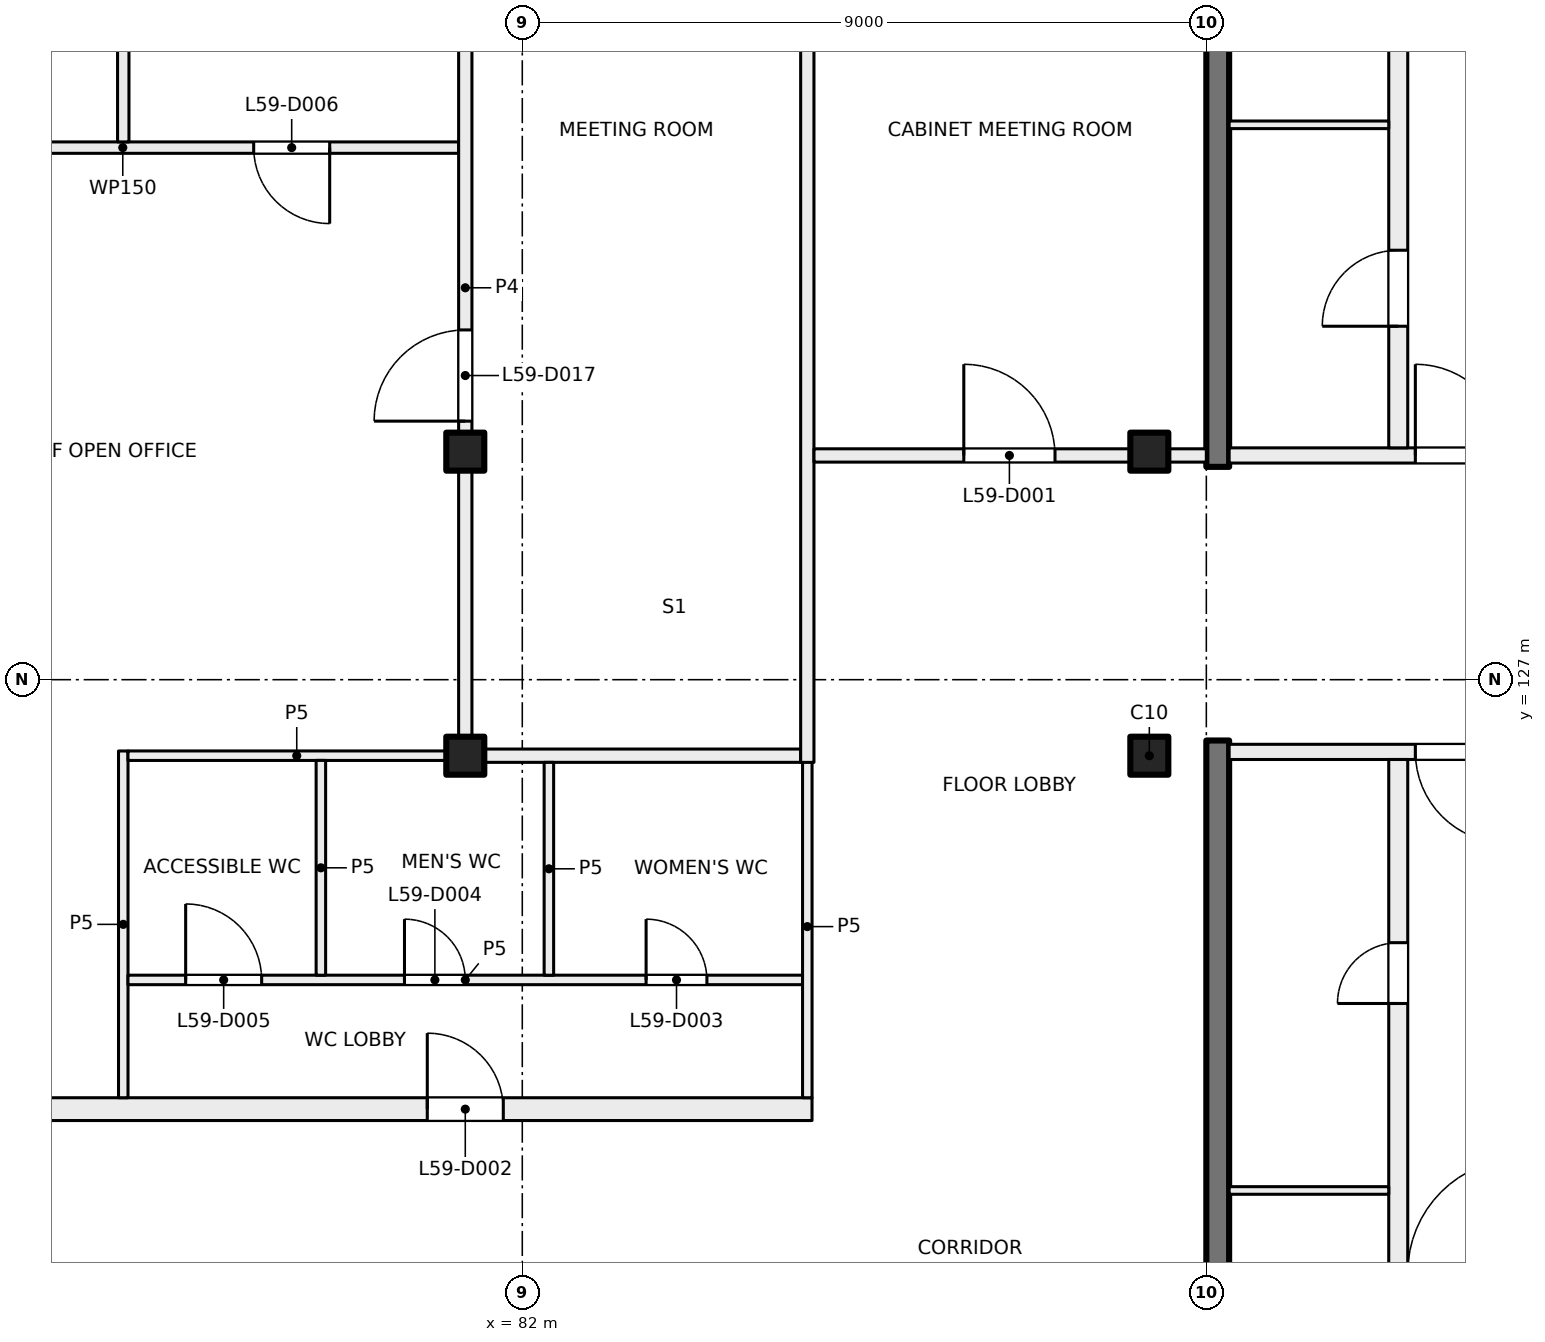
"""IFC4 building model, lengths in metres.
Left out: names, types, materials, properties, quantities, classifications, styles, units other than length and angle.
Written with IfcOpenShell. Run it as: python <this file> out.ifc"""

import sys

from ifc_helpers import new_model, si_unit, direction, frame, frame_2d, origin, origin_2d, place, context, subcontext, project, spatial, rectangle, extrude, element, fill, save


model = new_model("IFC4")
c1 = context("Model", 3, precision=1e-05, world=origin(), true_north=direction((0.0, 1.0)))
c2 = subcontext(c1, "Body", "Model", "MODEL_VIEW")
j1 = project(units=[si_unit("LENGTHUNIT", "METRE"), si_unit("PLANEANGLEUNIT", "RADIAN")], contexts=[c1])
p1 = place(None, origin())
s1 = spatial("IfcSite", under=j1, at=p1, CompositionType="ELEMENT")
p2 = place(p1, origin())
s2 = spatial("IfcBuilding", under=s1, at=p2, CompositionType="ELEMENT")
p3 = place(p2, frame((0.0, 0.0, 249.5)))
s3 = spatial("IfcBuildingStorey", under=s2, at=p3, CompositionType="ELEMENT", Elevation=249.5)
for number, where, z_axis, x_axis in (
    (1, (81.25, 130.0, 0.0), (0.0, 0.0, 1.0), (1.0, 0.0, 0.0)),
    (2, (90.25, 130.0, 0.0), (0.0, 0.0, 1.0), (1.0, 0.0, 0.0)),
    (3, (81.25, 126.0, 0.0), (0.0, 0.0, 1.0), (1.0, 0.0, 0.0)),
    (4, (90.25, 126.0, 0.0), (0.0, 0.0, 1.0), (1.0, 0.0, 0.0)),
):
    element("IfcColumn", number, at=place(p3, frame(where, z_axis=z_axis, x_axis=x_axis)), inside=s3, PredefinedType="COLUMN", context=c2, shape_type="SweptSolid", body=[
        extrude(rectangle(XDim=0.5, YDim=0.5, at=origin_2d()), origin(), (0.0, 0.0, 1.0), 4.0),
    ])
for number, where, z_axis, x_axis in (
    (5, (91.15, 138.55, 0.0), (0.0, 0.0, 1.0), (0.0, -1.0, 0.0)),
    (6, (91.15, 126.2, 0.0), (0.0, 0.0, 1.0), (0.0, -1.0, 0.0)),
):
    element("IfcWall", number, at=place(p3, frame(where, z_axis=z_axis, x_axis=x_axis)), inside=s3, PredefinedType="SHEAR", context=c2, shape_type="SweptSolid", body=[
        extrude(rectangle(XDim=8.75, YDim=0.3, at=frame_2d((4.375, 0.0))), origin(), (0.0, 0.0, 1.0), 4.0),
    ])
p4 = place(p3, frame((95.25, 126.05, 0.0), z_axis=(0.0, 0.0, 1.0), x_axis=(-1.0, 0.0, 0.0)))
e7 = element("IfcWall", 7, at=p4, inside=s3, PredefinedType="PARTITIONING", context=c2, shape_type="SweptSolid", body=[
    extrude(rectangle(XDim=3.95, YDim=0.2, at=frame_2d((1.975, 0.0))), origin(), (0.0, 0.0, 1.0), 3.625),
])
p5 = place(p4, frame((0.3, 0.0, 0.0)))
e8 = element("IfcOpeningElement", 8, at=p5, cuts=e7, PredefinedType="OPENING", context=c2, shape_type="SweptSolid", body=[
    extrude(rectangle(XDim=1.2, YDim=2.1, at=frame_2d((0.6, 1.05))), frame((0.0, 0.11, 0.0), z_axis=(0.0, -1.0, 0.0), x_axis=(1.0, 0.0, 0.0)), (0.0, 0.0, 1.0), 0.22),
])
p6 = place(p3, frame((93.525, 117.45, 0.0), z_axis=(0.0, 0.0, 1.0), x_axis=(0.0, 1.0, 0.0)))
e9 = element("IfcWall", 9, at=p6, inside=s3, PredefinedType="PARTITIONING", context=c2, shape_type="SweptSolid", body=[
    extrude(rectangle(XDim=8.5, YDim=0.25, at=frame_2d((4.25, 0.0))), origin(), (0.0, 0.0, 1.0), 3.625),
])
p7 = place(p6, frame((5.29, 0.0, 0.0)))
e10 = element("IfcOpeningElement", 10, at=p7, cuts=e9, PredefinedType="OPENING", context=c2, shape_type="SweptSolid", body=[
    extrude(rectangle(XDim=0.8, YDim=2.1, at=frame_2d((0.4, 1.05))), frame((0.0, 0.135, 0.0), z_axis=(0.0, -1.0, 0.0), x_axis=(1.0, 0.0, 0.0)), (0.0, 0.0, 1.0), 0.27),
])
p8 = place(p6, frame((0.99, 0.0, 0.0)))
e11 = element("IfcOpeningElement", 11, at=p8, cuts=e9, PredefinedType="OPENING", context=c2, shape_type="SweptSolid", body=[
    extrude(rectangle(XDim=0.8, YDim=2.1, at=frame_2d((0.4, 1.05))), frame((0.0, 0.135, 0.0), z_axis=(0.0, -1.0, 0.0), x_axis=(1.0, 0.0, 0.0)), (0.0, 0.0, 1.0), 0.27),
])
p9 = place(p3, frame((93.4, 120.28, 0.0), z_axis=(0.0, 0.0, 1.0), x_axis=(-1.0, 0.0, 0.0)))
e12 = element("IfcWall", 12, at=p9, inside=s3, PredefinedType="PARTITIONING", context=c2, shape_type="SweptSolid", body=[
    extrude(rectangle(XDim=2.1, YDim=0.1, at=frame_2d((1.05, 0.0))), origin(), (0.0, 0.0, 1.0), 3.625),
])
p10 = place(p3, frame((91.3, 129.95, 0.0), z_axis=(0.0, 0.0, 1.0), x_axis=(1.0, 0.0, 0.0)))
e13 = element("IfcWall", 13, at=p10, inside=s3, PredefinedType="PARTITIONING", context=c2, shape_type="SweptSolid", body=[
    extrude(rectangle(XDim=3.95, YDim=0.2, at=frame_2d((1.975, 0.0))), origin(), (0.0, 0.0, 1.0), 3.625),
])
p11 = place(p10, frame((2.45, 0.0, 0.0)))
e14 = element("IfcOpeningElement", 14, at=p11, cuts=e13, PredefinedType="OPENING", context=c2, shape_type="SweptSolid", body=[
    extrude(rectangle(XDim=1.2, YDim=2.1, at=frame_2d((0.6, 1.05))), frame((0.0, 0.11, 0.0), z_axis=(0.0, -1.0, 0.0), x_axis=(1.0, 0.0, 0.0)), (0.0, 0.0, 1.0), 0.22),
])
p12 = place(p3, frame((93.525, 130.05, 0.0), z_axis=(0.0, 0.0, 1.0), x_axis=(0.0, 1.0, 0.0)))
e15 = element("IfcWall", 15, at=p12, inside=s3, PredefinedType="PARTITIONING", context=c2, shape_type="SweptSolid", body=[
    extrude(rectangle(XDim=8.5, YDim=0.25, at=frame_2d((4.25, 0.0))), origin(), (0.0, 0.0, 1.0), 3.625),
])
p13 = place(p12, frame((1.6, 0.0, 0.0)))
e16 = element("IfcOpeningElement", 16, at=p13, cuts=e15, PredefinedType="OPENING", context=c2, shape_type="SweptSolid", body=[
    extrude(rectangle(XDim=1.0, YDim=2.1, at=frame_2d((0.5, 1.05))), frame((0.0, 0.135, 0.0), z_axis=(0.0, -1.0, 0.0), x_axis=(1.0, 0.0, 0.0)), (0.0, 0.0, 1.0), 0.27),
])
p14 = place(p12, frame((6.0, 0.0, 0.0)))
e17 = element("IfcOpeningElement", 17, at=p14, cuts=e15, PredefinedType="OPENING", context=c2, shape_type="SweptSolid", body=[
    extrude(rectangle(XDim=0.8, YDim=2.1, at=frame_2d((0.4, 1.05))), frame((0.0, 0.135, 0.0), z_axis=(0.0, -1.0, 0.0), x_axis=(1.0, 0.0, 0.0)), (0.0, 0.0, 1.0), 0.27),
])
p15 = place(p3, frame((91.3, 134.3, 0.0), z_axis=(0.0, 0.0, 1.0), x_axis=(1.0, 0.0, 0.0)))
e18 = element("IfcWall", 18, at=p15, inside=s3, PredefinedType="PARTITIONING", context=c2, shape_type="SweptSolid", body=[
    extrude(rectangle(XDim=2.1, YDim=0.1, at=frame_2d((1.05, 0.0))), origin(), (0.0, 0.0, 1.0), 3.625),
])
p16 = place(p3, frame((54.4, 121.35, 0.0), z_axis=(0.0, 0.0, 1.0), x_axis=(1.0, 0.0, 0.0)))
e19 = element("IfcWall", 19, at=p16, inside=s3, PredefinedType="PARTITIONING", context=c2, shape_type="SweptSolid", body=[
    extrude(rectangle(XDim=31.412, YDim=0.3, at=frame_2d((15.706, 0.0))), origin(), (0.0, 0.0, 1.0), 3.625),
])
p17 = place(p16, frame((26.35, 0.0, 0.0)))
e20 = element("IfcOpeningElement", 20, at=p17, cuts=e19, PredefinedType="OPENING", context=c2, shape_type="SweptSolid", body=[
    extrude(rectangle(XDim=1.0, YDim=2.1, at=frame_2d((0.5, 1.05))), frame((0.0, 0.16, 0.0), z_axis=(0.0, -1.0, 0.0), x_axis=(1.0, 0.0, 0.0)), (0.0, 0.0, 1.0), 0.32),
])
p18 = place(p16, frame((19.2, 0.0, 0.0)))
e21 = element("IfcOpeningElement", 21, at=p18, cuts=e19, PredefinedType="OPENING", context=c2, shape_type="SweptSolid", body=[
    extrude(rectangle(XDim=1.8, YDim=2.1, at=frame_2d((0.9, 1.05))), frame((0.0, 0.16, 0.0), z_axis=(0.0, -1.0, 0.0), x_axis=(1.0, 0.0, 0.0)), (0.0, 0.0, 1.0), 0.32),
])
p19 = place(p16, frame((15.0, 0.0, 0.0)))
e22 = element("IfcOpeningElement", 22, at=p19, cuts=e19, PredefinedType="OPENING", context=c2, shape_type="SweptSolid", body=[
    extrude(rectangle(XDim=1.2, YDim=2.1, at=frame_2d((0.6, 1.05))), frame((0.0, 0.16, 0.0), z_axis=(0.0, -1.0, 0.0), x_axis=(1.0, 0.0, 0.0)), (0.0, 0.0, 1.0), 0.32),
])
p20 = place(p16, frame((11.45, 0.0, 0.0)))
e23 = element("IfcOpeningElement", 23, at=p20, cuts=e19, PredefinedType="OPENING", context=c2, shape_type="SweptSolid", body=[
    extrude(rectangle(XDim=0.8, YDim=2.1, at=frame_2d((0.4, 1.05))), frame((0.0, 0.16, 0.0), z_axis=(0.0, -1.0, 0.0), x_axis=(1.0, 0.0, 0.0)), (0.0, 0.0, 1.0), 0.32),
])
p21 = place(p16, frame((3.515, 0.0, 0.0)))
e24 = element("IfcOpeningElement", 24, at=p21, cuts=e19, PredefinedType="OPENING", context=c2, shape_type="SweptSolid", body=[
    extrude(rectangle(XDim=1.8, YDim=2.1, at=frame_2d((0.9, 1.05))), frame((0.0, 0.16, 0.0), z_axis=(0.0, -1.0, 0.0), x_axis=(1.0, 0.0, 0.0)), (0.0, 0.0, 1.0), 0.32),
])
p22 = place(p3, frame((81.162, 134.0, 0.0), z_axis=(0.0, 0.0, 1.0), x_axis=(-1.0, 0.0, 0.0)))
e25 = element("IfcWall", 25, at=p22, inside=s3, PredefinedType="PARTITIONING", context=c2, shape_type="SweptSolid", body=[
    extrude(rectangle(XDim=8.837, YDim=0.15, at=frame_2d((4.418, 0.0))), origin(), (0.0, 0.0, 1.0), 3.625),
])
p23 = place(p22, frame((1.696, 0.0, 0.0)))
e26 = element("IfcOpeningElement", 26, at=p23, cuts=e25, PredefinedType="OPENING", context=c2, shape_type="SweptSolid", body=[
    extrude(rectangle(XDim=1.0, YDim=2.1, at=frame_2d((0.5, 1.05))), frame((0.0, 0.085, 0.0), z_axis=(0.0, -1.0, 0.0), x_axis=(1.0, 0.0, 0.0)), (0.0, 0.0, 1.0), 0.17),
])
p24 = place(p22, frame((6.135, 0.0, 0.0)))
e27 = element("IfcOpeningElement", 27, at=p24, cuts=e25, PredefinedType="OPENING", context=c2, shape_type="SweptSolid", body=[
    extrude(rectangle(XDim=1.0, YDim=2.1, at=frame_2d((0.5, 1.05))), frame((0.0, 0.085, 0.0), z_axis=(0.0, -1.0, 0.0), x_axis=(1.0, 0.0, 0.0)), (0.0, 0.0, 1.0), 0.17),
])
p25 = place(p3, frame((76.75, 121.5, 0.0), z_axis=(0.0, 0.0, 1.0), x_axis=(0.0, 1.0, 0.0)))
e28 = element("IfcWall", 28, at=p25, inside=s3, PredefinedType="PARTITIONING", context=c2, shape_type="SweptSolid", body=[
    extrude(rectangle(XDim=4.562, YDim=0.125, at=frame_2d((2.281, 0.0))), origin(), (0.0, 0.0, 1.0), 3.625),
])
p26 = place(p3, frame((76.812, 123.05, 0.0), z_axis=(0.0, 0.0, 1.0), x_axis=(1.0, 0.0, 0.0)))
e29 = element("IfcWall", 29, at=p26, inside=s3, PredefinedType="PARTITIONING", context=c2, shape_type="SweptSolid", body=[
    extrude(rectangle(XDim=8.876, YDim=0.125, at=frame_2d((4.438, 0.0))), origin(), (0.0, 0.0, 1.0), 3.625),
])
p27 = place(p26, frame((6.817, 0.0, 0.0)))
e30 = element("IfcOpeningElement", 30, at=p27, cuts=e29, PredefinedType="OPENING", context=c2, shape_type="SweptSolid", body=[
    extrude(rectangle(XDim=0.8, YDim=2.1, at=frame_2d((0.4, 1.05))), frame((0.0, 0.073, 0.0), z_axis=(0.0, -1.0, 0.0), x_axis=(1.0, 0.0, 0.0)), (0.0, 0.0, 1.0), 0.145),
])
p28 = place(p26, frame((3.638, 0.0, 0.0)))
e31 = element("IfcOpeningElement", 31, at=p28, cuts=e29, PredefinedType="OPENING", context=c2, shape_type="SweptSolid", body=[
    extrude(rectangle(XDim=0.8, YDim=2.1, at=frame_2d((0.4, 1.05))), frame((0.0, 0.073, 0.0), z_axis=(0.0, -1.0, 0.0), x_axis=(1.0, 0.0, 0.0)), (0.0, 0.0, 1.0), 0.145),
])
p29 = place(p26, frame((0.759, 0.0, 0.0)))
e32 = element("IfcOpeningElement", 32, at=p29, cuts=e29, PredefinedType="OPENING", context=c2, shape_type="SweptSolid", body=[
    extrude(rectangle(XDim=1.0, YDim=2.1, at=frame_2d((0.5, 1.05))), frame((0.0, 0.073, 0.0), z_axis=(0.0, -1.0, 0.0), x_axis=(1.0, 0.0, 0.0)), (0.0, 0.0, 1.0), 0.145),
])
p30 = place(p3, frame((76.812, 126.0, 0.0), z_axis=(0.0, 0.0, 1.0), x_axis=(1.0, 0.0, 0.0)))
e33 = element("IfcWall", 33, at=p30, inside=s3, PredefinedType="PARTITIONING", context=c2, shape_type="SweptSolid", body=[
    extrude(rectangle(XDim=4.441, YDim=0.125, at=frame_2d((2.22, 0.0))), origin(), (0.0, 0.0, 1.0), 3.625),
])
p31 = place(p3, frame((76.75, 134.075, 0.0), z_axis=(0.0, 0.0, 1.0), x_axis=(0.0, 1.0, 0.0)))
e34 = element("IfcWall", 34, at=p31, inside=s3, PredefinedType="PARTITIONING", context=c2, shape_type="SweptSolid", body=[
    extrude(rectangle(XDim=4.325, YDim=0.15, at=frame_2d((2.163, 0.0))), origin(), (0.0, 0.0, 1.0), 3.625),
])
p32 = place(p3, frame((79.35, 125.938, 0.0), z_axis=(0.0, 0.0, 1.0), x_axis=(0.0, -1.0, 0.0)))
e35 = element("IfcWall", 35, at=p32, inside=s3, PredefinedType="PARTITIONING", context=c2, shape_type="SweptSolid", body=[
    extrude(rectangle(XDim=2.826, YDim=0.125, at=frame_2d((1.413, 0.0))), origin(), (0.0, 0.0, 1.0), 3.625),
])
p33 = place(p3, frame((81.338, 126.0, 0.0), z_axis=(0.0, 0.0, 1.0), x_axis=(1.0, 0.0, 0.0)))
e36 = element("IfcWall", 36, at=p33, inside=s3, PredefinedType="PARTITIONING", context=c2, shape_type="SweptSolid", body=[
    extrude(rectangle(XDim=4.324, YDim=0.175, at=frame_2d((2.162, 0.0))), origin(), (0.0, 0.0, 1.0), 3.625),
])
p34 = place(p3, frame((81.25, 125.912, 0.0), z_axis=(0.0, 0.0, 1.0), x_axis=(0.0, 1.0, 0.0)))
e37 = element("IfcWall", 37, at=p34, inside=s3, PredefinedType="PARTITIONING", context=c2, shape_type="SweptSolid", body=[
    extrude(rectangle(XDim=12.488, YDim=0.175, at=frame_2d((6.244, 0.0))), origin(), (0.0, 0.0, 1.0), 3.625),
])
p35 = place(p34, frame((4.49, 0.0, 0.0)))
e38 = element("IfcOpeningElement", 38, at=p35, cuts=e37, PredefinedType="OPENING", context=c2, shape_type="SweptSolid", body=[
    extrude(rectangle(XDim=1.2, YDim=2.1, at=frame_2d((0.6, 1.05))), frame((0.0, 0.097, 0.0), z_axis=(0.0, -1.0, 0.0), x_axis=(1.0, 0.0, 0.0)), (0.0, 0.0, 1.0), 0.195),
])
p36 = place(p3, frame((82.35, 125.912, 0.0), z_axis=(0.0, 0.0, 1.0), x_axis=(0.0, -1.0, 0.0)))
e39 = element("IfcWall", 39, at=p36, inside=s3, PredefinedType="PARTITIONING", context=c2, shape_type="SweptSolid", body=[
    extrude(rectangle(XDim=2.8, YDim=0.125, at=frame_2d((1.4, 0.0))), origin(), (0.0, 0.0, 1.0), 3.625),
])
p37 = place(p3, frame((85.75, 121.5, 0.0), z_axis=(0.0, 0.0, 1.0), x_axis=(0.0, 1.0, 0.0)))
e40 = element("IfcWall", 40, at=p37, inside=s3, PredefinedType="PARTITIONING", context=c2, shape_type="SweptSolid", body=[
    extrude(rectangle(XDim=4.503, YDim=0.125, at=frame_2d((2.251, 0.0))), origin(), (0.0, 0.0, 1.0), 3.625),
])
p38 = place(p3, frame((85.75, 125.912, 0.0), z_axis=(0.0, 0.0, 1.0), x_axis=(0.0, 1.0, 0.0)))
e41 = element("IfcWall", 41, at=p38, inside=s3, PredefinedType="PARTITIONING", context=c2, shape_type="SweptSolid", body=[
    extrude(rectangle(XDim=12.488, YDim=0.175, at=frame_2d((6.244, 0.0))), origin(), (0.0, 0.0, 1.0), 3.625),
])
p39 = place(p3, frame((85.838, 129.95, 0.0), z_axis=(0.0, 0.0, 1.0), x_axis=(1.0, 0.0, 0.0)))
e42 = element("IfcWall", 42, at=p39, inside=s3, PredefinedType="PARTITIONING", context=c2, shape_type="SweptSolid", body=[
    extrude(rectangle(XDim=5.162, YDim=0.175, at=frame_2d((2.581, 0.0))), origin(), (0.0, 0.0, 1.0), 3.625),
])
p40 = place(p39, frame((1.971, 0.0, 0.0)))
e43 = element("IfcOpeningElement", 43, at=p40, cuts=e42, PredefinedType="OPENING", context=c2, shape_type="SweptSolid", body=[
    extrude(rectangle(XDim=1.2, YDim=2.1, at=frame_2d((0.6, 1.05))), frame((0.0, 0.097, 0.0), z_axis=(0.0, -1.0, 0.0), x_axis=(1.0, 0.0, 0.0)), (0.0, 0.0, 1.0), 0.195),
])
p41 = place(p5, origin())
e44 = element("IfcDoor", 44, at=p41, inside=s3, OperationType="DOUBLE_DOOR_SINGLE_SWING", PredefinedType="DOOR", context=c2, shape_type="SweptSolid", body=[
    extrude(rectangle(XDim=1.2, YDim=2.1, at=frame_2d((0.6, 1.05))), frame((0.0, 0.025, 0.0), z_axis=(0.0, -1.0, 0.0), x_axis=(1.0, 0.0, 0.0)), (0.0, 0.0, 1.0), 0.05),
])
fill(e8, e44)
p42 = place(p7, origin())
e45 = element("IfcDoor", 45, at=p42, inside=s3, OperationType="SINGLE_SWING_LEFT", PredefinedType="DOOR", context=c2, shape_type="SweptSolid", body=[
    extrude(rectangle(XDim=0.8, YDim=2.1, at=frame_2d((0.4, 1.05))), frame((0.0, 0.025, 0.0), z_axis=(0.0, -1.0, 0.0), x_axis=(1.0, 0.0, 0.0)), (0.0, 0.0, 1.0), 0.05),
])
fill(e10, e45)
p43 = place(p11, origin())
e46 = element("IfcDoor", 46, at=p43, inside=s3, OperationType="DOUBLE_DOOR_SINGLE_SWING", PredefinedType="DOOR", context=c2, shape_type="SweptSolid", body=[
    extrude(rectangle(XDim=1.2, YDim=2.1, at=frame_2d((0.6, 1.05))), frame((0.0, 0.025, 0.0), z_axis=(0.0, -1.0, 0.0), x_axis=(1.0, 0.0, 0.0)), (0.0, 0.0, 1.0), 0.05),
])
fill(e14, e46)
p44 = place(p13, origin())
e47 = element("IfcDoor", 47, at=p44, inside=s3, OperationType="SINGLE_SWING_RIGHT", PredefinedType="DOOR", context=c2, shape_type="SweptSolid", body=[
    extrude(rectangle(XDim=1.0, YDim=2.1, at=frame_2d((0.5, 1.05))), frame((0.0, 0.025, 0.0), z_axis=(0.0, -1.0, 0.0), x_axis=(1.0, 0.0, 0.0)), (0.0, 0.0, 1.0), 0.05),
])
fill(e16, e47)
p45 = place(p40, origin())
e48 = element("IfcDoor", 48, at=p45, inside=s3, OperationType="DOUBLE_DOOR_SINGLE_SWING", PredefinedType="DOOR", context=c2, shape_type="SweptSolid", body=[
    extrude(rectangle(XDim=1.2, YDim=2.1, at=frame_2d((0.6, 1.05))), frame((0.0, 0.025, 0.0), z_axis=(0.0, -1.0, 0.0), x_axis=(1.0, 0.0, 0.0)), (0.0, 0.0, 1.0), 0.05),
])
fill(e43, e48)
p46 = place(p17, origin())
e49 = element("IfcDoor", 49, at=p46, inside=s3, OperationType="SINGLE_SWING_LEFT", PredefinedType="DOOR", context=c2, shape_type="SweptSolid", body=[
    extrude(rectangle(XDim=1.0, YDim=2.1, at=frame_2d((0.5, 1.05))), frame((0.0, 0.025, 0.0), z_axis=(0.0, -1.0, 0.0), x_axis=(1.0, 0.0, 0.0)), (0.0, 0.0, 1.0), 0.05),
])
fill(e20, e49)
p47 = place(p27, origin())
e50 = element("IfcDoor", 50, at=p47, inside=s3, OperationType="SINGLE_SWING_RIGHT", PredefinedType="DOOR", context=c2, shape_type="SweptSolid", body=[
    extrude(rectangle(XDim=0.8, YDim=2.1, at=frame_2d((0.4, 1.05))), frame((0.0, 0.025, 0.0), z_axis=(0.0, -1.0, 0.0), x_axis=(1.0, 0.0, 0.0)), (0.0, 0.0, 1.0), 0.05),
])
fill(e30, e50)
p48 = place(p28, origin())
e51 = element("IfcDoor", 51, at=p48, inside=s3, OperationType="SINGLE_SWING_LEFT", PredefinedType="DOOR", context=c2, shape_type="SweptSolid", body=[
    extrude(rectangle(XDim=0.8, YDim=2.1, at=frame_2d((0.4, 1.05))), frame((0.0, 0.025, 0.0), z_axis=(0.0, -1.0, 0.0), x_axis=(1.0, 0.0, 0.0)), (0.0, 0.0, 1.0), 0.05),
])
fill(e31, e51)
p49 = place(p29, origin())
e52 = element("IfcDoor", 52, at=p49, inside=s3, OperationType="SINGLE_SWING_LEFT", PredefinedType="DOOR", context=c2, shape_type="SweptSolid", body=[
    extrude(rectangle(XDim=1.0, YDim=2.1, at=frame_2d((0.5, 1.05))), frame((0.0, 0.025, 0.0), z_axis=(0.0, -1.0, 0.0), x_axis=(1.0, 0.0, 0.0)), (0.0, 0.0, 1.0), 0.05),
])
fill(e32, e52)
p50 = place(p23, origin())
e53 = element("IfcDoor", 53, at=p50, inside=s3, OperationType="SINGLE_SWING_LEFT", PredefinedType="DOOR", context=c2, shape_type="SweptSolid", body=[
    extrude(rectangle(XDim=1.0, YDim=2.1, at=frame_2d((0.5, 1.05))), frame((0.0, 0.025, 0.0), z_axis=(0.0, -1.0, 0.0), x_axis=(1.0, 0.0, 0.0)), (0.0, 0.0, 1.0), 0.05),
])
fill(e26, e53)
p51 = place(p35, origin())
e54 = element("IfcDoor", 54, at=p51, inside=s3, OperationType="DOUBLE_DOOR_SINGLE_SWING", PredefinedType="DOOR", context=c2, shape_type="SweptSolid", body=[
    extrude(rectangle(XDim=1.2, YDim=2.1, at=frame_2d((0.6, 1.05))), frame((0.0, 0.025, 0.0), z_axis=(0.0, -1.0, 0.0), x_axis=(1.0, 0.0, 0.0)), (0.0, 0.0, 1.0), 0.05),
])
fill(e38, e54)
save(model, sys.argv[1])
